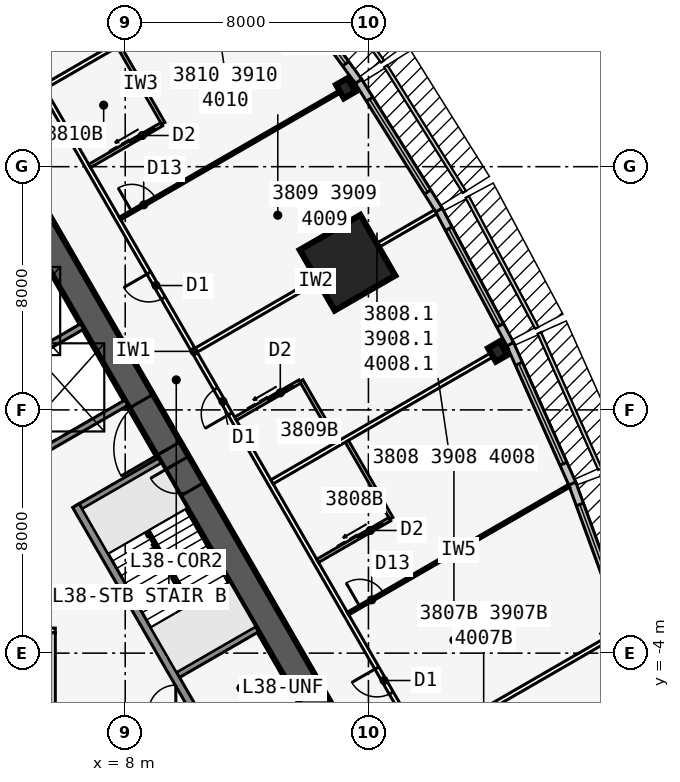
"""IFC4 building model, lengths in metres.
Left out: names, types, materials, properties, quantities, classifications, styles, units other than length and angle.
Written with IfcOpenShell. Run it as: python <this file> out.ifc"""

import sys

from ifc_helpers import new_model, si_unit, direction, frame, frame_2d, origin, origin_2d, place, context, subcontext, project, spatial, rectangle, i_section, extrude, element, fill, save


model = new_model("IFC4")
c1 = context("Model", 3, precision=1e-05, world=origin(), true_north=direction((0.0, 1.0)))
c2 = subcontext(c1, "Body", "Model", "MODEL_VIEW")
j1 = project(units=[si_unit("LENGTHUNIT", "METRE"), si_unit("PLANEANGLEUNIT", "RADIAN")], contexts=[c1])
p1 = place(None, origin())
s1 = spatial("IfcSite", under=j1, at=p1, CompositionType="ELEMENT")
p2 = place(p1, origin())
s2 = spatial("IfcBuilding", under=s1, at=p2, CompositionType="ELEMENT")
p3 = place(p2, frame((0.0, 0.0, 145.3)))
s3 = spatial("IfcBuildingStorey", under=s2, at=p3, CompositionType="ELEMENT", Elevation=145.3)
p4 = place(p3, frame((16.5, -9.526, 0.0), z_axis=(0.0, 0.0, 1.0), x_axis=(-0.499999749417, 0.866025548458, 0.0)))
e1 = element("IfcWall", 1, at=p4, inside=s3, PredefinedType="SHEAR", context=c2, shape_type="SweptSolid", body=[
    extrude(rectangle(XDim=33.0, YDim=0.9, at=frame_2d((16.5, 0.0))), origin(), (0.0, 0.0, 1.0), 3.4),
])
p5 = place(p4, frame((14.15, 0.0, 0.0)))
e2 = element("IfcOpeningElement", 2, at=p5, cuts=e1, PredefinedType="OPENING", context=c2, shape_type="SweptSolid", body=[
    extrude(rectangle(XDim=1.8, YDim=2.13, at=frame_2d((0.9, 1.065))), frame((0.0, 0.46, 0.0), z_axis=(0.0, -1.0, 0.0), x_axis=(1.0, 0.0, 0.0)), (0.0, 0.0, 1.0), 0.92),
])
p6 = place(p4, frame((12.6, 0.0, 0.0)))
e3 = element("IfcOpeningElement", 3, at=p6, cuts=e1, PredefinedType="OPENING", context=c2, shape_type="SweptSolid", body=[
    extrude(rectangle(XDim=1.0, YDim=2.13, at=frame_2d((0.5, 1.065))), frame((0.0, 0.46, 0.0), z_axis=(0.0, -1.0, 0.0), x_axis=(1.0, 0.0, 0.0)), (0.0, 0.0, 1.0), 0.92),
])
p7 = place(p3, frame((10.245, -5.843, 0.0), z_axis=(0.0, 0.0, 1.0), x_axis=(-0.499993009313, 0.866029439822, 0.0)))
e4 = element("IfcWall", 4, at=p7, inside=s3, PredefinedType="SOLIDWALL", context=c2, shape_type="SweptSolid", body=[
    extrude(rectangle(XDim=7.733, YDim=0.25, at=frame_2d((3.866, 0.0))), origin(), (0.0, 0.0, 1.0), 3.235),
])
for number, where, z_axis, x_axis in (
    (5, (9.629, -4.775, 0.0), (0.0, 0.0, 1.0), (0.866, 0.5, 0.0)),
    (6, (6.429, 0.767, 0.0), (0.0, 0.0, 1.0), (0.866, 0.5, 0.0)),
    (7, (5.329, 2.673, 0.0), (0.0, 0.0, 1.0), (0.866, 0.5, 0.0)),
    (8, (3.879, 5.184, 0.0), (0.0, 0.0, 1.0), (0.866, 0.5, 0.0)),
):
    element("IfcWall", number, at=place(p3, frame(where, z_axis=z_axis, x_axis=x_axis)), inside=s3, PredefinedType="SOLIDWALL", context=c2, shape_type="SweptSolid", body=[
        extrude(rectangle(XDim=3.125, YDim=0.2, at=frame_2d((1.562, 0.0))), origin(), (0.0, 0.0, 1.0), 3.235),
    ])
for number, where, z_axis, x_axis in (
    (9, (20.254, 5.92, 0.0), (0.0, 0.0, 1.0), (0.866, 0.5, 0.0)),
    (10, (15.254, 14.58, 0.0), (0.0, 0.0, 1.0), (0.866, 0.5, 0.0)),
):
    element("IfcColumn", number, at=place(p3, frame(where, z_axis=z_axis, x_axis=x_axis)), inside=s3, PredefinedType="COLUMN", context=c2, shape_type="SweptSolid", body=[
        extrude(i_section(OverallWidth=0.437, OverallDepth=0.513, WebThickness=0.061, FlangeThickness=0.097, at=origin_2d()), origin(), (0.0, 0.0, 1.0), 3.4),
    ])
p8 = place(p3, frame((15.312, 8.84, 0.0), z_axis=(0.0, 0.0, 1.0), x_axis=(0.866025403784, 0.5, 0.0)))
e11 = element("IfcColumn", 11, at=p8, inside=s3, PredefinedType="COLUMN", context=c2, shape_type="SweptSolid", body=[
    extrude(rectangle(XDim=2.3, YDim=2.3, at=origin_2d()), origin(), (0.0, 0.0, 1.0), 3.4),
])
p9 = place(p3, frame((24.444, -3.183, 0.0), z_axis=(0.0, 0.0, 1.0), x_axis=(-0.343225593282, 0.939252996863, 0.0)))
e12 = element("IfcWall", 12, at=p9, inside=s3, PredefinedType="STANDARD", context=c2, shape_type="SweptSolid", body=[
    extrude(rectangle(XDim=5.076, YDim=0.25, at=frame_2d((2.538, 0.0))), origin(), (0.0, 0.0, 1.0), 3.235),
])
p10 = place(p9, frame((0.738, 0.0, 0.45)))
e13 = element("IfcOpeningElement", 13, at=p10, cuts=e12, PredefinedType="OPENING", context=c2, shape_type="SweptSolid", body=[
    extrude(rectangle(XDim=3.6, YDim=2.4, at=frame_2d((1.8, 1.2))), frame((0.0, 0.135, 0.0), z_axis=(0.0, -1.0, 0.0), x_axis=(1.0, 0.0, 0.0)), (0.0, 0.0, 1.0), 0.27),
])
p11 = place(p3, frame((22.705, 1.576, 0.0), z_axis=(0.0, 0.0, 1.0), x_axis=(-0.406832200364, 0.913502906808, 0.0)))
e14 = element("IfcWall", 14, at=p11, inside=s3, PredefinedType="STANDARD", context=c2, shape_type="SweptSolid", body=[
    extrude(rectangle(XDim=5.028, YDim=0.25, at=frame_2d((2.514, 0.0))), origin(), (0.0, 0.0, 1.0), 3.235),
])
p12 = place(p11, frame((0.714, 0.0, 0.45)))
e15 = element("IfcOpeningElement", 15, at=p12, cuts=e14, PredefinedType="OPENING", context=c2, shape_type="SweptSolid", body=[
    extrude(rectangle(XDim=3.6, YDim=2.4, at=frame_2d((1.8, 1.2))), frame((0.0, 0.135, 0.0), z_axis=(0.0, -1.0, 0.0), x_axis=(1.0, 0.0, 0.0)), (0.0, 0.0, 1.0), 0.27),
])
p13 = place(p3, frame((20.663, 6.161, 0.0), z_axis=(0.0, 0.0, 1.0), x_axis=(-0.469404966864, 0.882982999317, 0.0)))
e16 = element("IfcWall", 16, at=p13, inside=s3, PredefinedType="STANDARD", context=c2, shape_type="SweptSolid", body=[
    extrude(rectangle(XDim=5.003, YDim=0.25, at=frame_2d((2.501, 0.0))), origin(), (0.0, 0.0, 1.0), 3.235),
])
p14 = place(p13, frame((0.701, 0.0, 0.45)))
e17 = element("IfcOpeningElement", 17, at=p14, cuts=e16, PredefinedType="OPENING", context=c2, shape_type="SweptSolid", body=[
    extrude(rectangle(XDim=3.6, YDim=2.4, at=frame_2d((1.8, 1.2))), frame((0.0, 0.135, 0.0), z_axis=(0.0, -1.0, 0.0), x_axis=(1.0, 0.0, 0.0)), (0.0, 0.0, 1.0), 0.27),
])
p15 = place(p3, frame((18.319, 10.571, 0.0), z_axis=(0.0, 0.0, 1.0), x_axis=(-0.529990167382, 0.84800378683, 0.0)))
e18 = element("IfcWall", 18, at=p15, inside=s3, PredefinedType="STANDARD", context=c2, shape_type="SweptSolid", body=[
    extrude(rectangle(XDim=5.003, YDim=0.25, at=frame_2d((2.501, 0.0))), origin(), (0.0, 0.0, 1.0), 3.235),
])
p16 = place(p15, frame((0.701, 0.0, 0.45)))
e19 = element("IfcOpeningElement", 19, at=p16, cuts=e18, PredefinedType="OPENING", context=c2, shape_type="SweptSolid", body=[
    extrude(rectangle(XDim=3.6, YDim=2.4, at=frame_2d((1.8, 1.2))), frame((0.0, 0.135, 0.0), z_axis=(0.0, -1.0, 0.0), x_axis=(1.0, 0.0, 0.0)), (0.0, 0.0, 1.0), 0.27),
])
p17 = place(p3, frame((15.672, 14.807, 0.0), z_axis=(0.0, 0.0, 1.0), x_axis=(-0.587669188412, 0.809101307001, 0.0)))
e20 = element("IfcWall", 20, at=p17, inside=s3, PredefinedType="STANDARD", context=c2, shape_type="SweptSolid", body=[
    extrude(rectangle(XDim=5.028, YDim=0.25, at=frame_2d((2.514, 0.0))), origin(), (0.0, 0.0, 1.0), 3.235),
])
p18 = place(p17, frame((0.714, 0.0, 0.45)))
e21 = element("IfcOpeningElement", 21, at=p18, cuts=e20, PredefinedType="OPENING", context=c2, shape_type="SweptSolid", body=[
    extrude(rectangle(XDim=3.6, YDim=2.4, at=frame_2d((1.8, 1.2))), frame((0.0, 0.135, 0.0), z_axis=(0.0, -1.0, 0.0), x_axis=(1.0, 0.0, 0.0)), (0.0, 0.0, 1.0), 0.27),
])
p19 = place(p3, frame((20.027, -10.985, 0.0), z_axis=(0.0, 0.0, 1.0), x_axis=(-0.500001677587, 0.866024435227, 0.0)))
e22 = element("IfcWall", 22, at=p19, inside=s3, PredefinedType="PARTITIONING", context=c2, shape_type="SweptSolid", body=[
    extrude(rectangle(XDim=39.054, YDim=0.15, at=frame_2d((19.527, 0.0))), origin(), (0.0, 0.0, 1.0), 3.235),
])
p20 = place(p19, frame((0.352, 0.0, 0.0)))
e23 = element("IfcOpeningElement", 23, at=p20, cuts=e22, PredefinedType="OPENING", context=c2, shape_type="SweptSolid", body=[
    extrude(rectangle(XDim=0.95, YDim=2.13, at=frame_2d((0.475, 1.065))), frame((0.0, 0.085, 0.0), z_axis=(0.0, -1.0, 0.0), x_axis=(1.0, 0.0, 0.0)), (0.0, 0.0, 1.0), 0.17),
])
p21 = place(p19, frame((6.552, 0.0, 0.0)))
e24 = element("IfcOpeningElement", 24, at=p21, cuts=e22, PredefinedType="OPENING", context=c2, shape_type="SweptSolid", body=[
    extrude(rectangle(XDim=0.95, YDim=2.13, at=frame_2d((0.475, 1.065))), frame((0.0, 0.085, 0.0), z_axis=(0.0, -1.0, 0.0), x_axis=(1.0, 0.0, 0.0)), (0.0, 0.0, 1.0), 0.17),
])
p22 = place(p19, frame((17.152, 0.0, 0.0)))
e25 = element("IfcOpeningElement", 25, at=p22, cuts=e22, PredefinedType="OPENING", context=c2, shape_type="SweptSolid", body=[
    extrude(rectangle(XDim=0.95, YDim=2.13, at=frame_2d((0.475, 1.065))), frame((0.0, 0.085, 0.0), z_axis=(0.0, -1.0, 0.0), x_axis=(1.0, 0.0, 0.0)), (0.0, 0.0, 1.0), 0.17),
])
p23 = place(p19, frame((21.552, 0.0, 0.0)))
e26 = element("IfcOpeningElement", 26, at=p23, cuts=e22, PredefinedType="OPENING", context=c2, shape_type="SweptSolid", body=[
    extrude(rectangle(XDim=0.95, YDim=2.13, at=frame_2d((0.475, 1.065))), frame((0.0, 0.085, 0.0), z_axis=(0.0, -1.0, 0.0), x_axis=(1.0, 0.0, 0.0)), (0.0, 0.0, 1.0), 0.17),
])
p24 = place(p19, frame((32.152, 0.0, 0.0)))
e27 = element("IfcOpeningElement", 27, at=p24, cuts=e22, PredefinedType="OPENING", context=c2, shape_type="SweptSolid", body=[
    extrude(rectangle(XDim=0.95, YDim=2.13, at=frame_2d((0.475, 1.065))), frame((0.0, 0.085, 0.0), z_axis=(0.0, -1.0, 0.0), x_axis=(1.0, 0.0, 0.0)), (0.0, 0.0, 1.0), 0.17),
])
p25 = place(p19, frame((37.752, 0.0, 0.0)))
e28 = element("IfcOpeningElement", 28, at=p25, cuts=e22, PredefinedType="OPENING", context=c2, shape_type="SweptSolid", body=[
    extrude(rectangle(XDim=0.95, YDim=2.13, at=frame_2d((0.475, 1.065))), frame((0.0, 0.085, 0.0), z_axis=(0.0, -1.0, 0.0), x_axis=(1.0, 0.0, 0.0)), (0.0, 0.0, 1.0), 0.17),
])
p26 = place(p3, frame((17.829, -7.027, 0.0), z_axis=(0.0, 0.0, 1.0), x_axis=(0.866029804378, 0.499992377871, 0.0)))
e29 = element("IfcWall", 29, at=p26, inside=s3, PredefinedType="PARTITIONING", context=c2, shape_type="SweptSolid", body=[
    extrude(rectangle(XDim=7.516, YDim=0.15, at=frame_2d((3.758, 0.0))), origin(), (0.0, 0.0, 1.0), 2.389),
])
p27 = place(p3, frame((15.329, -2.697, 0.0), z_axis=(0.0, 0.0, 1.0), x_axis=(0.866024316602, 0.50000188305, 0.0)))
e30 = element("IfcWall", 30, at=p27, inside=s3, PredefinedType="PARTITIONING", context=c2, shape_type="SweptSolid", body=[
    extrude(rectangle(XDim=8.395, YDim=0.1, at=frame_2d((4.198, 0.0))), origin(), (0.0, 0.0, 1.0), 2.389),
])
p28 = place(p27, frame((0.45, 0.0, 0.0)))
e31 = element("IfcOpeningElement", 31, at=p28, cuts=e30, PredefinedType="OPENING", context=c2, shape_type="SweptSolid", body=[
    extrude(rectangle(XDim=0.9, YDim=2.13, at=frame_2d((0.45, 1.065))), frame((0.0, 0.06, 0.0), z_axis=(0.0, -1.0, 0.0), x_axis=(1.0, 0.0, 0.0)), (0.0, 0.0, 1.0), 0.12),
])
p29 = place(p3, frame((12.829, 1.633, 0.0), z_axis=(0.0, 0.0, 1.0), x_axis=(0.866027015393, 0.499997208602, 0.0)))
e32 = element("IfcWall", 32, at=p29, inside=s3, PredefinedType="PARTITIONING", context=c2, shape_type="SweptSolid", body=[
    extrude(rectangle(XDim=8.922, YDim=0.15, at=frame_2d((4.461, 0.0))), origin(), (0.0, 0.0, 1.0), 2.389),
])
p30 = place(p3, frame((10.329, 5.963, 0.0), z_axis=(0.0, 0.0, 1.0), x_axis=(0.866025170687, 0.500000403736, 0.0)))
e33 = element("IfcWall", 33, at=p30, inside=s3, PredefinedType="PARTITIONING", context=c2, shape_type="SweptSolid", body=[
    extrude(rectangle(XDim=9.099, YDim=0.15, at=frame_2d((4.549, 0.0))), origin(), (0.0, 0.0, 1.0), 2.389),
])
p31 = place(p3, frame((7.829, 10.293, 0.0), z_axis=(0.0, 0.0, 1.0), x_axis=(0.866027015393, 0.499997208602, 0.0)))
e34 = element("IfcWall", 34, at=p31, inside=s3, PredefinedType="PARTITIONING", context=c2, shape_type="SweptSolid", body=[
    extrude(rectangle(XDim=8.922, YDim=0.1, at=frame_2d((4.461, 0.0))), origin(), (0.0, 0.0, 1.0), 2.389),
])
p32 = place(p31, frame((0.45, 0.0, 0.0)))
e35 = element("IfcOpeningElement", 35, at=p32, cuts=e34, PredefinedType="OPENING", context=c2, shape_type="SweptSolid", body=[
    extrude(rectangle(XDim=0.9, YDim=2.13, at=frame_2d((0.45, 1.065))), frame((0.0, 0.06, 0.0), z_axis=(0.0, -1.0, 0.0), x_axis=(1.0, 0.0, 0.0)), (0.0, 0.0, 1.0), 0.12),
])
p33 = place(p3, frame((5.329, 14.623, 0.0), z_axis=(0.0, 0.0, 1.0), x_axis=(0.866011723728, 0.500023693804, 0.0)))
e36 = element("IfcWall", 36, at=p33, inside=s3, PredefinedType="PARTITIONING", context=c2, shape_type="SweptSolid", body=[
    extrude(rectangle(XDim=8.395, YDim=0.15, at=frame_2d((4.198, 0.0))), origin(), (0.0, 0.0, 1.0), 2.389),
])
for number, where, z_axis, x_axis in (
    (37, (21.753, -8.225, 0.0), (0.0, 0.0, 1.0), (-0.5, 0.866, 0.0)),
    (38, (16.753, 0.435, 0.0), (0.0, 0.0, 1.0), (-0.5, 0.866, 0.0)),
):
    element("IfcWall", number, at=place(p3, frame(where, z_axis=z_axis, x_axis=x_axis)), inside=s3, PredefinedType="PLUMBINGWALL", context=c2, shape_type="SweptSolid", body=[
        extrude(rectangle(XDim=3.0, YDim=0.12, at=frame_2d((1.5, 0.0))), origin(), (0.0, 0.0, 1.0), 3.235),
    ])
p34 = place(p3, frame((14.329, -0.965, 0.0), z_axis=(0.0, 0.0, 1.0), x_axis=(0.866035715982, 0.499982138324, 0.0)))
e39 = element("IfcWall", 39, at=p34, inside=s3, PredefinedType="PLUMBINGWALL", context=c2, shape_type="SweptSolid", body=[
    extrude(rectangle(XDim=2.74, YDim=0.12, at=frame_2d((1.37, 0.0))), origin(), (0.0, 0.0, 1.0), 3.235),
])
p35 = place(p34, frame((1.55, 0.0, 0.0)))
e40 = element("IfcOpeningElement", 40, at=p35, cuts=e39, PredefinedType="OPENING", context=c2, shape_type="SweptSolid", body=[
    extrude(rectangle(XDim=0.9, YDim=2.13, at=frame_2d((0.45, 1.065))), frame((0.0, 0.07, 0.0), z_axis=(0.0, -1.0, 0.0), x_axis=(1.0, 0.0, 0.0)), (0.0, 0.0, 1.0), 0.14),
])
p36 = place(p3, frame((14.993, 2.883, 0.0), z_axis=(0.0, 0.0, 1.0), x_axis=(-0.500001309137, 0.866024647952, 0.0)))
e41 = element("IfcWall", 41, at=p36, inside=s3, PredefinedType="PLUMBINGWALL", context=c2, shape_type="SweptSolid", body=[
    extrude(rectangle(XDim=2.4, YDim=0.12, at=frame_2d((1.2, 0.0))), origin(), (0.0, 0.0, 1.0), 3.235),
])
p37 = place(p3, frame((11.628, 3.711, 0.0), z_axis=(0.0, 0.0, 1.0), x_axis=(0.866048967903, 0.499959183527, 0.0)))
e42 = element("IfcWall", 42, at=p37, inside=s3, PredefinedType="PLUMBINGWALL", context=c2, shape_type="SweptSolid", body=[
    extrude(rectangle(XDim=2.44, YDim=0.12, at=frame_2d((1.22, 0.0))), origin(), (0.0, 0.0, 1.0), 3.235),
])
p38 = place(p37, frame((1.25, 0.0, 0.0)))
e43 = element("IfcOpeningElement", 43, at=p38, cuts=e42, PredefinedType="OPENING", context=c2, shape_type="SweptSolid", body=[
    extrude(rectangle(XDim=0.9, YDim=2.13, at=frame_2d((0.45, 1.065))), frame((0.0, 0.07, 0.0), z_axis=(0.0, -1.0, 0.0), x_axis=(1.0, 0.0, 0.0)), (0.0, 0.0, 1.0), 0.14),
])
p39 = place(p3, frame((9.253, 13.425, 0.0), z_axis=(0.0, 0.0, 1.0), x_axis=(-0.499990139034, 0.866031096941, 0.0)))
e44 = element("IfcWall", 44, at=p39, inside=s3, PredefinedType="PLUMBINGWALL", context=c2, shape_type="SweptSolid", body=[
    extrude(rectangle(XDim=3.0, YDim=0.12, at=frame_2d((1.5, 0.0))), origin(), (0.0, 0.0, 1.0), 3.235),
])
p40 = place(p3, frame((6.829, 12.025, 0.0), z_axis=(0.0, 0.0, 1.0), x_axis=(0.866035715982, 0.499982138324, 0.0)))
e45 = element("IfcWall", 45, at=p40, inside=s3, PredefinedType="PLUMBINGWALL", context=c2, shape_type="SweptSolid", body=[
    extrude(rectangle(XDim=2.74, YDim=0.12, at=frame_2d((1.37, 0.0))), origin(), (0.0, 0.0, 1.0), 3.235),
])
p41 = place(p40, frame((1.55, 0.0, 0.0)))
e46 = element("IfcOpeningElement", 46, at=p41, cuts=e45, PredefinedType="OPENING", context=c2, shape_type="SweptSolid", body=[
    extrude(rectangle(XDim=0.9, YDim=2.13, at=frame_2d((0.45, 1.065))), frame((0.0, 0.07, 0.0), z_axis=(0.0, -1.0, 0.0), x_axis=(1.0, 0.0, 0.0)), (0.0, 0.0, 1.0), 0.14),
])
p42 = place(p3, frame((-2.65, -3.251, 0.0), z_axis=(0.0, 0.0, 1.0), x_axis=(1.0, 0.0, 0.0)))
e47 = element("IfcWall", 47, at=p42, inside=s3, PredefinedType="PARTITIONING", context=c2, shape_type="SweptSolid", body=[
    extrude(rectangle(XDim=8.35, YDim=0.15, at=frame_2d((4.175, 0.0))), origin(), (0.0, 0.0, 1.0), 3.235),
])
p43 = place(p3, frame((5.625, -5.826, 0.0), z_axis=(0.0, 0.0, 1.0), x_axis=(0.0, 1.0, 0.0)))
e48 = element("IfcWall", 48, at=p43, inside=s3, PredefinedType="PARTITIONING", context=c2, shape_type="SweptSolid", body=[
    extrude(rectangle(XDim=2.5, YDim=0.15, at=frame_2d((1.25, 0.0))), origin(), (0.0, 0.0, 1.0), 3.235),
])
p44 = place(p3, frame((10.135, -2.401, 0.0), z_axis=(0.0, 0.0, 1.0), x_axis=(-0.499992232847, 0.866029888106, 0.0)))
e49 = element("IfcWall", 49, at=p44, inside=s3, PredefinedType="SOLIDWALL", context=c2, shape_type="SweptSolid", body=[
    extrude(rectangle(XDim=2.794, YDim=0.1, at=frame_2d((1.397, 0.0))), origin(), (0.0, 0.0, 1.0), 3.4),
])
p45 = place(p10, origin())
e50 = element("IfcWindow", 50, at=p45, inside=s3, PartitioningType="SINGLE_PANEL", PredefinedType="WINDOW", context=c2, shape_type="SweptSolid", body=[
    extrude(rectangle(XDim=3.6, YDim=2.4, at=frame_2d((1.8, 1.2))), frame((0.0, 0.03, 0.0), z_axis=(0.0, -1.0, 0.0), x_axis=(1.0, 0.0, 0.0)), (0.0, 0.0, 1.0), 0.06),
])
fill(e13, e50)
p46 = place(p12, origin())
e51 = element("IfcWindow", 51, at=p46, inside=s3, PartitioningType="SINGLE_PANEL", PredefinedType="WINDOW", context=c2, shape_type="SweptSolid", body=[
    extrude(rectangle(XDim=3.6, YDim=2.4, at=frame_2d((1.8, 1.2))), frame((0.0, 0.03, 0.0), z_axis=(0.0, -1.0, 0.0), x_axis=(1.0, 0.0, 0.0)), (0.0, 0.0, 1.0), 0.06),
])
fill(e15, e51)
p47 = place(p14, origin())
e52 = element("IfcWindow", 52, at=p47, inside=s3, PartitioningType="SINGLE_PANEL", PredefinedType="WINDOW", context=c2, shape_type="SweptSolid", body=[
    extrude(rectangle(XDim=3.6, YDim=2.4, at=frame_2d((1.8, 1.2))), frame((0.0, 0.03, 0.0), z_axis=(0.0, -1.0, 0.0), x_axis=(1.0, 0.0, 0.0)), (0.0, 0.0, 1.0), 0.06),
])
fill(e17, e52)
p48 = place(p16, origin())
e53 = element("IfcWindow", 53, at=p48, inside=s3, PartitioningType="SINGLE_PANEL", PredefinedType="WINDOW", context=c2, shape_type="SweptSolid", body=[
    extrude(rectangle(XDim=3.6, YDim=2.4, at=frame_2d((1.8, 1.2))), frame((0.0, 0.03, 0.0), z_axis=(0.0, -1.0, 0.0), x_axis=(1.0, 0.0, 0.0)), (0.0, 0.0, 1.0), 0.06),
])
fill(e19, e53)
p49 = place(p18, origin())
e54 = element("IfcWindow", 54, at=p49, inside=s3, PartitioningType="SINGLE_PANEL", PredefinedType="WINDOW", context=c2, shape_type="SweptSolid", body=[
    extrude(rectangle(XDim=3.6, YDim=2.4, at=frame_2d((1.8, 1.2))), frame((0.0, 0.03, 0.0), z_axis=(0.0, -1.0, 0.0), x_axis=(1.0, 0.0, 0.0)), (0.0, 0.0, 1.0), 0.06),
])
fill(e21, e54)
p50 = place(p28, origin())
e55 = element("IfcDoor", 55, at=p50, inside=s3, OperationType="SINGLE_SWING_LEFT", PredefinedType="DOOR", context=c2, shape_type="SweptSolid", body=[
    extrude(rectangle(XDim=0.9, YDim=2.13, at=frame_2d((0.45, 1.065))), frame((0.0, 0.025, 0.0), z_axis=(0.0, -1.0, 0.0), x_axis=(1.0, 0.0, 0.0)), (0.0, 0.0, 1.0), 0.05),
])
fill(e31, e55)
p51 = place(p32, origin())
e56 = element("IfcDoor", 56, at=p51, inside=s3, OperationType="SINGLE_SWING_LEFT", PredefinedType="DOOR", context=c2, shape_type="SweptSolid", body=[
    extrude(rectangle(XDim=0.9, YDim=2.13, at=frame_2d((0.45, 1.065))), frame((0.0, 0.025, 0.0), z_axis=(0.0, -1.0, 0.0), x_axis=(1.0, 0.0, 0.0)), (0.0, 0.0, 1.0), 0.05),
])
fill(e35, e56)
p52 = place(p21, origin())
e57 = element("IfcDoor", 57, at=p52, inside=s3, OperationType="SINGLE_SWING_RIGHT", PredefinedType="DOOR", context=c2, shape_type="SweptSolid", body=[
    extrude(rectangle(XDim=0.95, YDim=2.13, at=frame_2d((0.475, 1.065))), frame((0.0, 0.025, 0.0), z_axis=(0.0, -1.0, 0.0), x_axis=(1.0, 0.0, 0.0)), (0.0, 0.0, 1.0), 0.05),
])
fill(e24, e57)
p53 = place(p35, origin())
e58 = element("IfcDoor", 58, at=p53, inside=s3, OperationType="SLIDING_TO_LEFT", PredefinedType="DOOR", context=c2, shape_type="SweptSolid", body=[
    extrude(rectangle(XDim=0.9, YDim=2.13, at=frame_2d((0.45, 1.065))), frame((0.0, 0.025, 0.0), z_axis=(0.0, -1.0, 0.0), x_axis=(1.0, 0.0, 0.0)), (0.0, 0.0, 1.0), 0.05),
])
fill(e40, e58)
p54 = place(p38, origin())
e59 = element("IfcDoor", 59, at=p54, inside=s3, OperationType="SLIDING_TO_LEFT", PredefinedType="DOOR", context=c2, shape_type="SweptSolid", body=[
    extrude(rectangle(XDim=0.9, YDim=2.13, at=frame_2d((0.45, 1.065))), frame((0.0, 0.025, 0.0), z_axis=(0.0, -1.0, 0.0), x_axis=(1.0, 0.0, 0.0)), (0.0, 0.0, 1.0), 0.05),
])
fill(e43, e59)
p55 = place(p22, origin())
e60 = element("IfcDoor", 60, at=p55, inside=s3, OperationType="SINGLE_SWING_LEFT", PredefinedType="DOOR", context=c2, shape_type="SweptSolid", body=[
    extrude(rectangle(XDim=0.95, YDim=2.13, at=frame_2d((0.475, 1.065))), frame((0.0, 0.025, 0.0), z_axis=(0.0, -1.0, 0.0), x_axis=(1.0, 0.0, 0.0)), (0.0, 0.0, 1.0), 0.05),
])
fill(e25, e60)
p56 = place(p23, origin())
e61 = element("IfcDoor", 61, at=p56, inside=s3, OperationType="SINGLE_SWING_RIGHT", PredefinedType="DOOR", context=c2, shape_type="SweptSolid", body=[
    extrude(rectangle(XDim=0.95, YDim=2.13, at=frame_2d((0.475, 1.065))), frame((0.0, 0.025, 0.0), z_axis=(0.0, -1.0, 0.0), x_axis=(1.0, 0.0, 0.0)), (0.0, 0.0, 1.0), 0.05),
])
fill(e26, e61)
p57 = place(p41, origin())
e62 = element("IfcDoor", 62, at=p57, inside=s3, OperationType="SLIDING_TO_LEFT", PredefinedType="DOOR", context=c2, shape_type="SweptSolid", body=[
    extrude(rectangle(XDim=0.9, YDim=2.13, at=frame_2d((0.45, 1.065))), frame((0.0, 0.025, 0.0), z_axis=(0.0, -1.0, 0.0), x_axis=(1.0, 0.0, 0.0)), (0.0, 0.0, 1.0), 0.05),
])
fill(e46, e62)
p58 = place(p5, origin())
e63 = element("IfcDoor", 63, at=p58, inside=s3, OperationType="DOUBLE_DOOR_SINGLE_SWING", PredefinedType="DOOR", context=c2, shape_type="SweptSolid", body=[
    extrude(rectangle(XDim=1.8, YDim=2.13, at=frame_2d((0.9, 1.065))), frame((0.0, 0.025, 0.0), z_axis=(0.0, -1.0, 0.0), x_axis=(1.0, 0.0, 0.0)), (0.0, 0.0, 1.0), 0.05),
])
fill(e2, e63)
p59 = place(p6, origin())
e64 = element("IfcDoor", 64, at=p59, inside=s3, OperationType="SINGLE_SWING_RIGHT", PredefinedType="DOOR", context=c2, shape_type="SweptSolid", body=[
    extrude(rectangle(XDim=1.0, YDim=2.13, at=frame_2d((0.5, 1.065))), frame((0.0, 0.025, 0.0), z_axis=(0.0, -1.0, 0.0), x_axis=(1.0, 0.0, 0.0)), (0.0, 0.0, 1.0), 0.05),
])
fill(e3, e64)
save(model, sys.argv[1])
